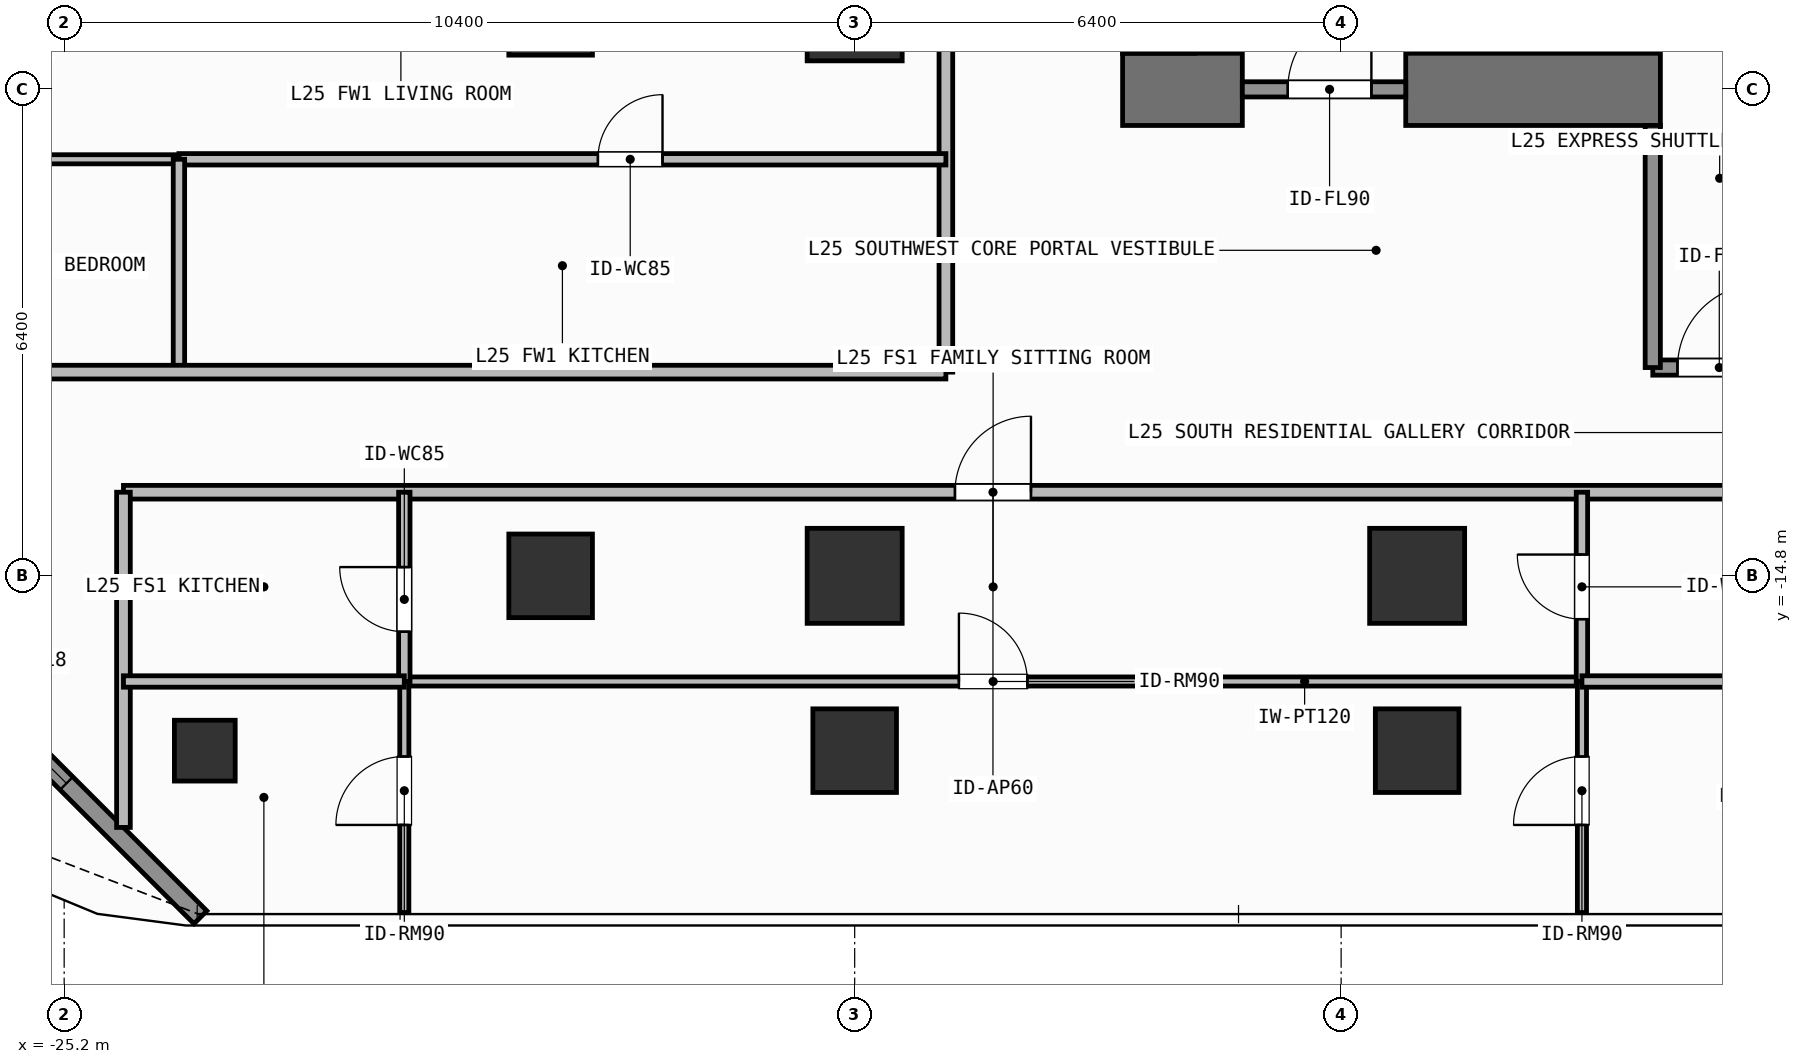
"""IFC4 building model, lengths in metres.
Left out: names, types, materials, properties, quantities, classifications, styles, units other than length and angle.
Written with IfcOpenShell. Run it as: python <this file> out.ifc"""

import sys

from ifc_helpers import new_model, si_unit, direction, frame, frame_2d, origin, origin_2d, place, context, subcontext, project, spatial, rectangle, hollow_rectangle, extrude, element, fill, save


model = new_model("IFC4")
c1 = context("Model", 3, precision=1e-05, world=origin(), true_north=direction((0.0, 1.0)))
c2 = subcontext(c1, "Body", "Model", "MODEL_VIEW")
j1 = project(units=[si_unit("LENGTHUNIT", "METRE"), si_unit("PLANEANGLEUNIT", "RADIAN")], contexts=[c1])
p1 = place(None, origin())
s1 = spatial("IfcSite", under=j1, at=p1, CompositionType="ELEMENT")
p2 = place(p1, origin())
s2 = spatial("IfcBuilding", under=s1, at=p2, CompositionType="ELEMENT")
p3 = place(p2, frame((0.0, 0.0, 100.8)))
s3 = spatial("IfcBuildingStorey", under=s2, at=p3, CompositionType="ELEMENT", Elevation=100.8)
p4 = place(p3, frame((-11.275, -8.4, 0.0), z_axis=(0.0, 0.0, 1.0), x_axis=(1.0, 0.0, 0.0)))
e1 = element("IfcWall", 1, at=p4, inside=s3, PredefinedType="SHEAR", context=c2, shape_type="SweptSolid", body=[
    extrude(rectangle(XDim=1.575, YDim=0.95, at=frame_2d((0.788, 0.0))), origin(), (0.0, 0.0, 1.0), 3.9),
])
p5 = place(p3, frame((-7.55, -8.4, 0.0), z_axis=(0.0, 0.0, 1.0), x_axis=(1.0, 0.0, 0.0)))
e2 = element("IfcWall", 2, at=p5, inside=s3, PredefinedType="SHEAR", context=c2, shape_type="SweptSolid", body=[
    extrude(rectangle(XDim=3.35, YDim=0.95, at=frame_2d((1.675, 0.0))), origin(), (0.0, 0.0, 1.0), 3.9),
])
p6 = place(p3, frame((-10.8, -7.925, 0.0), z_axis=(0.0, 0.0, 1.0), x_axis=(0.0, 1.0, 0.0)))
e3 = element("IfcWall", 3, at=p6, inside=s3, PredefinedType="SHEAR", context=c2, shape_type="SweptSolid", body=[
    extrude(rectangle(XDim=15.85, YDim=0.95, at=frame_2d((7.925, 0.0))), origin(), (0.0, 0.0, 1.0), 3.9),
])
for number, where, z_axis, x_axis in (
    (4, (-14.8, -14.8, 0.0), (0.0, 0.0, 1.0), (1.0, 0.0, 0.0)),
    (5, (-7.4, -14.8, 0.0), (0.0, 0.0, 1.0), (1.0, 0.0, 0.0)),
    (6, (-14.8, -7.4, 0.0), (0.0, 0.0, 1.0), (1.0, 0.0, 0.0)),
):
    element("IfcColumn", number, at=place(p3, frame(where, z_axis=z_axis, x_axis=x_axis)), inside=s3, PredefinedType="COLUMN", context=c2, shape_type="SweptSolid", body=[
        extrude(rectangle(XDim=1.25, YDim=1.25, at=origin_2d()), origin(), (0.0, 0.0, 1.0), 3.9),
    ])
for number, where, z_axis, x_axis in (
    (7, (-18.8, -14.8, 0.0), (0.0, 0.0, 1.0), (1.0, 0.0, 0.0)),
    (8, (-18.8, -7.4, 0.0), (0.0, 0.0, 1.0), (1.0, 0.0, 0.0)),
    (9, (-14.8, -17.1, 0.0), (0.0, 0.0, 1.0), (1.0, 0.0, 0.0)),
    (10, (-7.4, -17.1, 0.0), (0.0, 0.0, 1.0), (1.0, 0.0, 0.0)),
):
    element("IfcColumn", number, at=place(p3, frame(where, z_axis=z_axis, x_axis=x_axis)), inside=s3, PredefinedType="COLUMN", context=c2, shape_type="SweptSolid", body=[
        extrude(rectangle(XDim=1.1, YDim=1.1, at=origin_2d()), origin(), (0.0, 0.0, 1.0), 3.9),
    ])
p7 = place(p3, frame((-23.35, -17.1, 0.0), z_axis=(0.0, 0.0, 1.0), x_axis=(1.0, 0.0, 0.0)))
e11 = element("IfcColumn", 11, at=p7, inside=s3, PredefinedType="COLUMN", context=c2, shape_type="SweptSolid", body=[
    extrude(hollow_rectangle(XDim=0.8, YDim=0.8, WallThickness=0.036, at=origin_2d()), origin(), (0.0, 0.0, 1.0), 3.9),
])
p8 = place(p3, frame((-23.408, -19.292, 0.0), z_axis=(0.0, 0.0, 1.0), x_axis=(-0.707087954376, 0.707125607496, 0.0)))
e12 = element("IfcWall", 12, at=p8, inside=s3, PredefinedType="SOLIDWALL", context=c2, shape_type="SweptSolid", body=[
    extrude(rectangle(XDim=6.484, YDim=0.24, at=frame_2d((3.242, 0.0))), origin(), (0.0, 0.0, 1.0), 3.68),
])
p9 = place(p8, frame((2.492, 0.0, 0.8)))
e13 = element("IfcOpeningElement", 13, at=p9, cuts=e12, PredefinedType="OPENING", context=c2, shape_type="SweptSolid", body=[
    extrude(rectangle(XDim=1.5, YDim=1.85, at=frame_2d((0.75, 0.925))), frame((0.0, 0.13, 0.0), z_axis=(0.0, -1.0, 0.0), x_axis=(1.0, 0.0, 0.0)), (0.0, 0.0, 1.0), 0.26),
])
p10 = place(p3, frame((-9.7, -8.4, 0.0), z_axis=(0.0, 0.0, 1.0), x_axis=(1.0, 0.0, 0.0)))
e14 = element("IfcWall", 14, at=p10, inside=s3, PredefinedType="SOLIDWALL", context=c2, shape_type="SweptSolid", body=[
    extrude(rectangle(XDim=2.15, YDim=0.2, at=frame_2d((1.075, 0.0))), origin(), (0.0, 0.0, 1.0), 2.72),
])
p11 = place(p10, frame((0.598, 0.0, 0.0)))
e15 = element("IfcOpeningElement", 15, at=p11, cuts=e14, PredefinedType="OPENING", context=c2, shape_type="SweptSolid", body=[
    extrude(rectangle(XDim=1.1, YDim=2.15, at=frame_2d((0.55, 1.075))), frame((0.0, 0.11, 0.0), z_axis=(0.0, -1.0, 0.0), x_axis=(1.0, 0.0, 0.0)), (0.0, 0.0, 1.0), 0.22),
])
p12 = place(p3, frame((-4.3, -12.06, 0.0), z_axis=(0.0, 0.0, 1.0), x_axis=(1.0, 0.0, 0.0)))
e16 = element("IfcWall", 16, at=p12, inside=s3, PredefinedType="SOLIDWALL", context=c2, shape_type="SweptSolid", body=[
    extrude(rectangle(XDim=1.75, YDim=0.2, at=frame_2d((0.875, 0.0))), origin(), (0.0, 0.0, 1.0), 3.68),
])
p13 = place(p12, frame((0.325, 0.0, 0.0)))
e17 = element("IfcOpeningElement", 17, at=p13, cuts=e16, PredefinedType="OPENING", context=c2, shape_type="SweptSolid", body=[
    extrude(rectangle(XDim=1.1, YDim=2.15, at=frame_2d((0.55, 1.075))), frame((0.0, 0.11, 0.0), z_axis=(0.0, -1.0, 0.0), x_axis=(1.0, 0.0, 0.0)), (0.0, 0.0, 1.0), 0.22),
])
p14 = place(p3, frame((-24.42, -13.7, 0.0), z_axis=(0.0, 0.0, 1.0), x_axis=(1.0, 0.0, 0.0)))
e18 = element("IfcWall", 18, at=p14, inside=s3, PredefinedType="PARTITIONING", context=c2, shape_type="SweptSolid", body=[
    extrude(rectangle(XDim=25.394, YDim=0.18, at=frame_2d((12.697, 0.0))), origin(), (0.0, 0.0, 1.0), 3.68),
])
p15 = place(p14, frame((10.939, 0.0, 0.0)))
e19 = element("IfcOpeningElement", 19, at=p15, cuts=e18, PredefinedType="OPENING", context=c2, shape_type="SweptSolid", body=[
    extrude(rectangle(XDim=1.0, YDim=2.2, at=frame_2d((0.5, 1.1))), frame((0.0, 0.1, 0.0), z_axis=(0.0, -1.0, 0.0), x_axis=(1.0, 0.0, 0.0)), (0.0, 0.0, 1.0), 0.2),
])
p16 = place(p3, frame((-20.725, -16.19, 0.0), z_axis=(0.0, 0.0, 1.0), x_axis=(1.0, 0.0, 0.0)))
e20 = element("IfcWall", 20, at=p16, inside=s3, PredefinedType="PARTITIONING", context=c2, shape_type="SweptSolid", body=[
    extrude(rectangle(XDim=15.493, YDim=0.12, at=frame_2d((7.747, 0.0))), origin(), (0.0, 0.0, 1.0), 3.68),
])
p17 = place(p16, frame((7.296, 0.0, 0.0)))
e21 = element("IfcOpeningElement", 21, at=p17, cuts=e20, PredefinedType="OPENING", context=c2, shape_type="SweptSolid", body=[
    extrude(rectangle(XDim=0.9, YDim=2.1, at=frame_2d((0.45, 1.05))), frame((0.0, 0.07, 0.0), z_axis=(0.0, -1.0, 0.0), x_axis=(1.0, 0.0, 0.0)), (0.0, 0.0, 1.0), 0.14),
])
p18 = place(p3, frame((-20.725, -16.19, 0.0), z_axis=(0.0, 0.0, 1.0), x_axis=(0.0, 1.0, 0.0)))
e22 = element("IfcWall", 22, at=p18, inside=s3, PredefinedType="PARTITIONING", context=c2, shape_type="SweptSolid", body=[
    extrude(rectangle(XDim=2.49, YDim=0.15, at=frame_2d((1.245, 0.0))), origin(), (0.0, 0.0, 1.0), 3.68),
])
p19 = place(p18, frame((0.655, 0.0, 0.0)))
e23 = element("IfcOpeningElement", 23, at=p19, cuts=e22, PredefinedType="OPENING", context=c2, shape_type="SweptSolid", body=[
    extrude(rectangle(XDim=0.85, YDim=2.1, at=frame_2d((0.425, 1.05))), frame((0.0, 0.085, 0.0), z_axis=(0.0, -1.0, 0.0), x_axis=(1.0, 0.0, 0.0)), (0.0, 0.0, 1.0), 0.17),
])
p20 = place(p3, frame((-20.725, -19.23, 0.0), z_axis=(0.0, 0.0, 1.0), x_axis=(0.0, 1.0, 0.0)))
e24 = element("IfcWall", 24, at=p20, inside=s3, PredefinedType="PARTITIONING", context=c2, shape_type="SweptSolid", body=[
    extrude(rectangle(XDim=3.04, YDim=0.12, at=frame_2d((1.52, 0.0))), origin(), (0.0, 0.0, 1.0), 3.68),
])
p21 = place(p20, frame((1.153, 0.0, 0.0)))
e25 = element("IfcOpeningElement", 25, at=p21, cuts=e24, PredefinedType="OPENING", context=c2, shape_type="SweptSolid", body=[
    extrude(rectangle(XDim=0.9, YDim=2.1, at=frame_2d((0.45, 1.05))), frame((0.0, 0.07, 0.0), z_axis=(0.0, -1.0, 0.0), x_axis=(1.0, 0.0, 0.0)), (0.0, 0.0, 1.0), 0.14),
])
p22 = place(p3, frame((-5.232, -16.19, 0.0), z_axis=(0.0, 0.0, 1.0), x_axis=(0.0, 1.0, 0.0)))
e26 = element("IfcWall", 26, at=p22, inside=s3, PredefinedType="PARTITIONING", context=c2, shape_type="SweptSolid", body=[
    extrude(rectangle(XDim=2.49, YDim=0.15, at=frame_2d((1.245, 0.0))), origin(), (0.0, 0.0, 1.0), 3.68),
])
p23 = place(p22, frame((0.82, 0.0, 0.0)))
e27 = element("IfcOpeningElement", 27, at=p23, cuts=e26, PredefinedType="OPENING", context=c2, shape_type="SweptSolid", body=[
    extrude(rectangle(XDim=0.85, YDim=2.1, at=frame_2d((0.425, 1.05))), frame((0.0, 0.085, 0.0), z_axis=(0.0, -1.0, 0.0), x_axis=(1.0, 0.0, 0.0)), (0.0, 0.0, 1.0), 0.17),
])
p24 = place(p3, frame((-5.232, -19.23, 0.0), z_axis=(0.0, 0.0, 1.0), x_axis=(0.0, 1.0, 0.0)))
e28 = element("IfcWall", 28, at=p24, inside=s3, PredefinedType="PARTITIONING", context=c2, shape_type="SweptSolid", body=[
    extrude(rectangle(XDim=3.04, YDim=0.12, at=frame_2d((1.52, 0.0))), origin(), (0.0, 0.0, 1.0), 3.68),
])
p25 = place(p24, frame((1.153, 0.0, 0.0)))
e29 = element("IfcOpeningElement", 29, at=p25, cuts=e28, PredefinedType="OPENING", context=c2, shape_type="SweptSolid", body=[
    extrude(rectangle(XDim=0.9, YDim=2.1, at=frame_2d((0.45, 1.05))), frame((0.0, 0.07, 0.0), z_axis=(0.0, -1.0, 0.0), x_axis=(1.0, 0.0, 0.0)), (0.0, 0.0, 1.0), 0.14),
])
p26 = place(p3, frame((-13.6, -12.12, 0.0), z_axis=(0.0, 0.0, 1.0), x_axis=(0.0, 1.0, 0.0)))
e30 = element("IfcWall", 30, at=p26, inside=s3, PredefinedType="PARTITIONING", context=c2, shape_type="SweptSolid", body=[
    extrude(rectangle(XDim=10.52, YDim=0.18, at=frame_2d((5.26, 0.0))), origin(), (0.0, 0.0, 1.0), 3.68),
])
p27 = place(p26, frame((5.468, 0.0, 0.0)))
e31 = element("IfcOpeningElement", 31, at=p27, cuts=e30, PredefinedType="OPENING", context=c2, shape_type="SweptSolid", body=[
    extrude(rectangle(XDim=1.0, YDim=2.2, at=frame_2d((0.5, 1.1))), frame((0.0, 0.1, 0.0), z_axis=(0.0, -1.0, 0.0), x_axis=(1.0, 0.0, 0.0)), (0.0, 0.0, 1.0), 0.2),
])
p28 = place(p3, frame((-23.69, -9.32, 0.0), z_axis=(0.0, 0.0, 1.0), x_axis=(1.0, 0.0, 0.0)))
e32 = element("IfcWall", 32, at=p28, inside=s3, PredefinedType="PARTITIONING", context=c2, shape_type="SweptSolid", body=[
    extrude(rectangle(XDim=10.09, YDim=0.15, at=frame_2d((5.045, 0.0))), origin(), (0.0, 0.0, 1.0), 3.68),
])
p29 = place(p28, frame((5.512, 0.0, 0.0)))
e33 = element("IfcOpeningElement", 33, at=p29, cuts=e32, PredefinedType="OPENING", context=c2, shape_type="SweptSolid", body=[
    extrude(rectangle(XDim=0.85, YDim=2.1, at=frame_2d((0.425, 1.05))), frame((0.0, 0.085, 0.0), z_axis=(0.0, -1.0, 0.0), x_axis=(1.0, 0.0, 0.0)), (0.0, 0.0, 1.0), 0.17),
])
p30 = place(p3, frame((-27.93, -9.32, 0.0), z_axis=(0.0, 0.0, 1.0), x_axis=(1.0, 0.0, 0.0)))
e34 = element("IfcWall", 34, at=p30, inside=s3, PredefinedType="PARTITIONING", context=c2, shape_type="SweptSolid", body=[
    extrude(rectangle(XDim=4.24, YDim=0.12, at=frame_2d((2.12, 0.0))), origin(), (0.0, 0.0, 1.0), 3.68),
])
p31 = place(p30, frame((1.581, 0.0, 0.0)))
e35 = element("IfcOpeningElement", 35, at=p31, cuts=e34, PredefinedType="OPENING", context=c2, shape_type="SweptSolid", body=[
    extrude(rectangle(XDim=0.9, YDim=2.1, at=frame_2d((0.45, 1.05))), frame((0.0, 0.07, 0.0), z_axis=(0.0, -1.0, 0.0), x_axis=(1.0, 0.0, 0.0)), (0.0, 0.0, 1.0), 0.14),
])
p32 = place(p3, frame((-4.3, -12.06, 0.0), z_axis=(0.0, 0.0, 1.0), x_axis=(0.0, 1.0, 0.0)))
e36 = element("IfcWall", 36, at=p32, inside=s3, PredefinedType="SOLIDWALL", context=c2, shape_type="SweptSolid", body=[
    extrude(rectangle(XDim=3.185, YDim=0.2, at=frame_2d((1.593, 0.0))), origin(), (0.0, 0.0, 1.0), 3.68),
])
p33 = place(p3, frame((-24.42, -18.11, 0.0), z_axis=(0.0, 0.0, 1.0), x_axis=(0.0, 1.0, 0.0)))
e37 = element("IfcWall", 37, at=p33, inside=s3, PredefinedType="PARTITIONING", context=c2, shape_type="SweptSolid", body=[
    extrude(rectangle(XDim=4.41, YDim=0.18, at=frame_2d((2.205, 0.0))), origin(), (0.0, 0.0, 1.0), 3.68),
])
p34 = place(p3, frame((-24.42, -16.19, 0.0), z_axis=(0.0, 0.0, 1.0), x_axis=(1.0, 0.0, 0.0)))
e38 = element("IfcWall", 38, at=p34, inside=s3, PredefinedType="PARTITIONING", context=c2, shape_type="SweptSolid", body=[
    extrude(rectangle(XDim=3.695, YDim=0.15, at=frame_2d((1.847, 0.0))), origin(), (0.0, 0.0, 1.0), 3.68),
])
p35 = place(p3, frame((-5.232, -16.19, 0.0), z_axis=(0.0, 0.0, 1.0), x_axis=(1.0, 0.0, 0.0)))
e39 = element("IfcWall", 39, at=p35, inside=s3, PredefinedType="PARTITIONING", context=c2, shape_type="SweptSolid", body=[
    extrude(rectangle(XDim=6.206, YDim=0.15, at=frame_2d((3.103, 0.0))), origin(), (0.0, 0.0, 1.0), 3.68),
])
p36 = place(p3, frame((-23.69, -12.12, 0.0), z_axis=(0.0, 0.0, 1.0), x_axis=(0.0, 1.0, 0.0)))
e40 = element("IfcWall", 40, at=p36, inside=s3, PredefinedType="PARTITIONING", context=c2, shape_type="SweptSolid", body=[
    extrude(rectangle(XDim=2.8, YDim=0.15, at=frame_2d((1.4, 0.0))), origin(), (0.0, 0.0, 1.0), 3.68),
])
p37 = place(p3, frame((-27.93, -12.12, 0.0), z_axis=(0.0, 0.0, 1.0), x_axis=(1.0, 0.0, 0.0)))
e41 = element("IfcWall", 41, at=p37, inside=s3, PredefinedType="PARTITIONING", context=c2, shape_type="SweptSolid", body=[
    extrude(rectangle(XDim=14.33, YDim=0.18, at=frame_2d((7.165, 0.0))), origin(), (0.0, 0.0, 1.0), 3.68),
])
p38 = place(p9, origin())
e42 = element("IfcWindow", 42, at=p38, inside=s3, PartitioningType="SINGLE_PANEL", PredefinedType="WINDOW", context=c2, shape_type="SweptSolid", body=[
    extrude(rectangle(XDim=1.5, YDim=1.85, at=frame_2d((0.75, 0.925))), frame((0.0, 0.03, 0.0), z_axis=(0.0, -1.0, 0.0), x_axis=(1.0, 0.0, 0.0)), (0.0, 0.0, 1.0), 0.06),
])
fill(e13, e42)
p39 = place(p11, origin())
e43 = element("IfcDoor", 43, at=p39, inside=s3, OperationType="SINGLE_SWING_RIGHT", PredefinedType="DOOR", context=c2, shape_type="SweptSolid", body=[
    extrude(rectangle(XDim=1.1, YDim=2.15, at=frame_2d((0.55, 1.075))), frame((0.0, 0.025, 0.0), z_axis=(0.0, -1.0, 0.0), x_axis=(1.0, 0.0, 0.0)), (0.0, 0.0, 1.0), 0.05),
])
fill(e15, e43)
p40 = place(p13, origin())
e44 = element("IfcDoor", 44, at=p40, inside=s3, OperationType="SINGLE_SWING_RIGHT", PredefinedType="DOOR", context=c2, shape_type="SweptSolid", body=[
    extrude(rectangle(XDim=1.1, YDim=2.15, at=frame_2d((0.55, 1.075))), frame((0.0, 0.025, 0.0), z_axis=(0.0, -1.0, 0.0), x_axis=(1.0, 0.0, 0.0)), (0.0, 0.0, 1.0), 0.05),
])
fill(e17, e44)
p41 = place(p15, origin())
e45 = element("IfcDoor", 45, at=p41, inside=s3, OperationType="SINGLE_SWING_RIGHT", PredefinedType="DOOR", context=c2, shape_type="SweptSolid", body=[
    extrude(rectangle(XDim=1.0, YDim=2.2, at=frame_2d((0.5, 1.1))), frame((0.0, 0.025, 0.0), z_axis=(0.0, -1.0, 0.0), x_axis=(1.0, 0.0, 0.0)), (0.0, 0.0, 1.0), 0.05),
])
fill(e19, e45)
p42 = place(p17, origin())
e46 = element("IfcDoor", 46, at=p42, inside=s3, OperationType="SINGLE_SWING_LEFT", PredefinedType="DOOR", context=c2, shape_type="SweptSolid", body=[
    extrude(rectangle(XDim=0.9, YDim=2.1, at=frame_2d((0.45, 1.05))), frame((0.0, 0.025, 0.0), z_axis=(0.0, -1.0, 0.0), x_axis=(1.0, 0.0, 0.0)), (0.0, 0.0, 1.0), 0.05),
])
fill(e21, e46)
p43 = place(p19, origin())
e47 = element("IfcDoor", 47, at=p43, inside=s3, OperationType="SINGLE_SWING_RIGHT", PredefinedType="DOOR", context=c2, shape_type="SweptSolid", body=[
    extrude(rectangle(XDim=0.85, YDim=2.1, at=frame_2d((0.425, 1.05))), frame((0.0, 0.025, 0.0), z_axis=(0.0, -1.0, 0.0), x_axis=(1.0, 0.0, 0.0)), (0.0, 0.0, 1.0), 0.05),
])
fill(e23, e47)
p44 = place(p21, origin())
e48 = element("IfcDoor", 48, at=p44, inside=s3, OperationType="SINGLE_SWING_LEFT", PredefinedType="DOOR", context=c2, shape_type="SweptSolid", body=[
    extrude(rectangle(XDim=0.9, YDim=2.1, at=frame_2d((0.45, 1.05))), frame((0.0, 0.025, 0.0), z_axis=(0.0, -1.0, 0.0), x_axis=(1.0, 0.0, 0.0)), (0.0, 0.0, 1.0), 0.05),
])
fill(e25, e48)
p45 = place(p23, origin())
e49 = element("IfcDoor", 49, at=p45, inside=s3, OperationType="SINGLE_SWING_RIGHT", PredefinedType="DOOR", context=c2, shape_type="SweptSolid", body=[
    extrude(rectangle(XDim=0.85, YDim=2.1, at=frame_2d((0.425, 1.05))), frame((0.0, 0.025, 0.0), z_axis=(0.0, -1.0, 0.0), x_axis=(1.0, 0.0, 0.0)), (0.0, 0.0, 1.0), 0.05),
])
fill(e27, e49)
p46 = place(p25, origin())
e50 = element("IfcDoor", 50, at=p46, inside=s3, OperationType="SINGLE_SWING_LEFT", PredefinedType="DOOR", context=c2, shape_type="SweptSolid", body=[
    extrude(rectangle(XDim=0.9, YDim=2.1, at=frame_2d((0.45, 1.05))), frame((0.0, 0.025, 0.0), z_axis=(0.0, -1.0, 0.0), x_axis=(1.0, 0.0, 0.0)), (0.0, 0.0, 1.0), 0.05),
])
fill(e29, e50)
p47 = place(p29, origin())
e51 = element("IfcDoor", 51, at=p47, inside=s3, OperationType="SINGLE_SWING_RIGHT", PredefinedType="DOOR", context=c2, shape_type="SweptSolid", body=[
    extrude(rectangle(XDim=0.85, YDim=2.1, at=frame_2d((0.425, 1.05))), frame((0.0, 0.025, 0.0), z_axis=(0.0, -1.0, 0.0), x_axis=(1.0, 0.0, 0.0)), (0.0, 0.0, 1.0), 0.05),
])
fill(e33, e51)
save(model, sys.argv[1])
